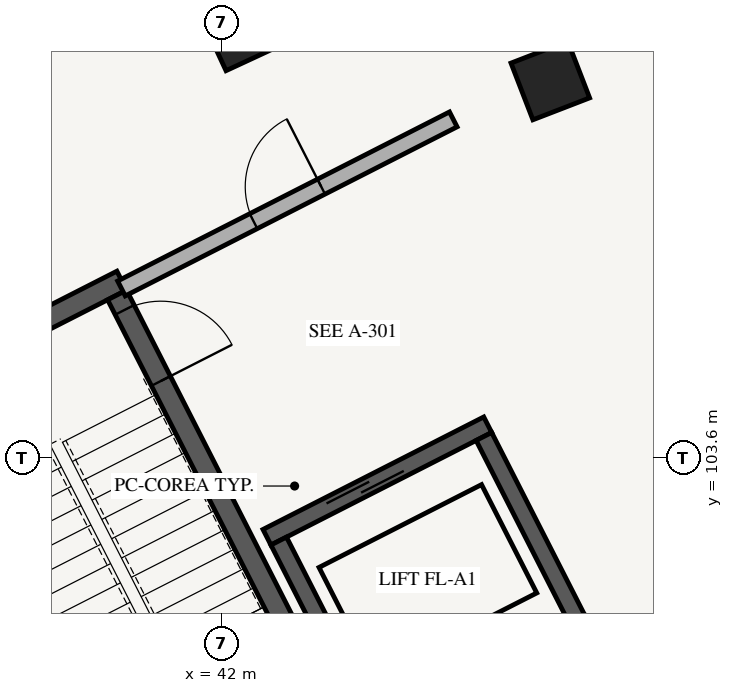
"""IFC4 building model, lengths in metres.
Left out: names, types, materials, properties, quantities, classifications, styles, units other than length and angle.
Written with IfcOpenShell. Run it as: python <this file> out.ifc"""

import sys

from ifc_helpers import new_model, si_unit, direction, frame, frame_2d, origin, origin_2d, place, context, subcontext, project, spatial, rectangle, extrude, element, fill, save


model = new_model("IFC4")
c1 = context("Model", 3, precision=1e-05, world=origin(), true_north=direction((0.0, 1.0)))
c2 = subcontext(c1, "Body", "Model", "MODEL_VIEW")
j1 = project(units=[si_unit("LENGTHUNIT", "METRE"), si_unit("PLANEANGLEUNIT", "RADIAN")], contexts=[c1])
p1 = place(None, origin())
s1 = spatial("IfcSite", under=j1, at=p1, CompositionType="ELEMENT")
p2 = place(p1, origin())
s2 = spatial("IfcBuilding", under=s1, at=p2, CompositionType="ELEMENT")
p3 = place(p2, frame((0.0, 0.0, -4.2)))
s3 = spatial("IfcBuildingStorey", under=s2, at=p3, CompositionType="ELEMENT", Elevation=-4.2)
p4 = place(p3, frame((37.773, 104.296, 0.0), z_axis=(0.0, 0.0, 1.0), x_axis=(0.453992276384, -0.891005618941, 0.0)))
e1 = element("IfcWall", 1, at=p4, inside=s3, PredefinedType="SHEAR", context=c2, shape_type="SweptSolid", body=[
    extrude(rectangle(XDim=6.6, YDim=0.28, at=frame_2d((3.3, 0.0))), origin(), (0.0, 0.0, 1.0), 3.92),
])
p5 = place(p3, frame((37.585, 104.357, 0.0), z_axis=(0.0, 0.0, 1.0), x_axis=(0.891020222667, 0.453963613958, 0.0)))
e2 = element("IfcWall", 2, at=p5, inside=s3, PredefinedType="SHEAR", context=c2, shape_type="SweptSolid", body=[
    extrude(rectangle(XDim=3.48, YDim=0.28, at=frame_2d((1.74, 0.0))), origin(), (0.0, 0.0, 1.0), 3.92),
])
p6 = place(p3, frame((40.625, 105.748, 0.0), z_axis=(0.0, 0.0, 1.0), x_axis=(0.453992276384, -0.891005618941, 0.0)))
e3 = element("IfcWall", 3, at=p6, inside=s3, PredefinedType="SHEAR", context=c2, shape_type="SweptSolid", body=[
    extrude(rectangle(XDim=6.6, YDim=0.28, at=frame_2d((3.3, 0.0))), origin(), (0.0, 0.0, 1.0), 3.92),
])
p7 = place(p6, frame((0.22, 0.0, 0.0)))
e4 = element("IfcOpeningElement", 4, at=p7, cuts=e3, PredefinedType="OPENING", context=c2, shape_type="SweptSolid", body=[
    extrude(rectangle(XDim=1.05, YDim=2.15, at=frame_2d((0.525, 1.075))), frame((0.0, 0.15, 0.0), z_axis=(0.0, -1.0, 0.0), x_axis=(1.0, 0.0, 0.0)), (0.0, 0.0, 1.0), 0.3),
])
p8 = place(p3, frame((42.597, 102.561, 0.0), z_axis=(0.0, 0.0, 1.0), x_axis=(0.891001200497, 0.454000947921, 0.0)))
e5 = element("IfcWall", 5, at=p8, inside=s3, PredefinedType="SHEAR", context=c2, shape_type="SweptSolid", body=[
    extrude(rectangle(XDim=3.26, YDim=0.23, at=frame_2d((1.63, 0.0))), origin(), (0.0, 0.0, 1.0), 3.92),
])
p9 = place(p8, frame((0.9, 0.0, 0.0)))
e6 = element("IfcOpeningElement", 6, at=p9, cuts=e5, PredefinedType="OPENING", context=c2, shape_type="SweptSolid", body=[
    extrude(rectangle(XDim=1.1, YDim=2.15, at=frame_2d((0.55, 1.075))), frame((0.0, 0.125, 0.0), z_axis=(0.0, -1.0, 0.0), x_axis=(1.0, 0.0, 0.0)), (0.0, 0.0, 1.0), 0.25),
])
for number, where, z_axis, x_axis in (
    (7, (42.751, 102.511, 0.0), (0.0, 0.0, 1.0), (0.454, -0.891, 0.0)),
    (8, (45.451, 103.886, 0.0), (0.0, 0.0, 1.0), (0.454, -0.891, 0.0)),
):
    element("IfcWall", number, at=place(p3, frame(where, z_axis=z_axis, x_axis=x_axis)), inside=s3, PredefinedType="SHEAR", context=c2, shape_type="SweptSolid", body=[
        extrude(rectangle(XDim=2.7, YDim=0.23, at=frame_2d((1.35, 0.0))), origin(), (0.0, 0.0, 1.0), 3.92),
    ])
for number, where, z_axis, x_axis in (
    (9, (46.325, 108.57, 0.0), (0.0, 0.0, 1.0), (-0.36, 0.933, 0.0)),
    (10, (42.252, 109.23, 0.0), (0.0, 0.0, 1.0), (-0.421, 0.907, 0.0)),
):
    element("IfcColumn", number, at=place(p3, frame(where, z_axis=z_axis, x_axis=x_axis)), inside=s3, PredefinedType="COLUMN", context=c2, shape_type="SweptSolid", body=[
        extrude(rectangle(XDim=0.8, YDim=0.8, at=origin_2d()), origin(), (0.0, 0.0, 1.0), 3.92),
    ])
p10 = place(p3, frame((40.682, 105.834, 0.0), z_axis=(0.0, 0.0, 1.0), x_axis=(0.891003372311, 0.453996685595, 0.0)))
e11 = element("IfcWall", 11, at=p10, inside=s3, PredefinedType="PARTITIONING", context=c2, shape_type="SweptSolid", body=[
    extrude(rectangle(XDim=4.9, YDim=0.22, at=frame_2d((2.45, 0.0))), origin(), (0.0, 0.0, 1.0), 3.18),
])
p11 = place(p10, frame((1.95, 0.0, 0.0)))
e12 = element("IfcOpeningElement", 12, at=p11, cuts=e11, PredefinedType="OPENING", context=c2, shape_type="SweptSolid", body=[
    extrude(rectangle(XDim=1.0, YDim=2.15, at=frame_2d((0.5, 1.075))), frame((0.0, 0.12, 0.0), z_axis=(0.0, -1.0, 0.0), x_axis=(1.0, 0.0, 0.0)), (0.0, 0.0, 1.0), 0.24),
])
p12 = place(p7, origin())
e13 = element("IfcDoor", 13, at=p12, inside=s3, OperationType="SINGLE_SWING_RIGHT", PredefinedType="DOOR", context=c2, shape_type="SweptSolid", body=[
    extrude(rectangle(XDim=1.05, YDim=2.15, at=frame_2d((0.525, 1.075))), frame((0.0, 0.025, 0.0), z_axis=(0.0, -1.0, 0.0), x_axis=(1.0, 0.0, 0.0)), (0.0, 0.0, 1.0), 0.05),
])
fill(e4, e13)
p13 = place(p9, origin())
e14 = element("IfcDoor", 14, at=p13, inside=s3, OperationType="DOUBLE_DOOR_SLIDING", PredefinedType="DOOR", context=c2, shape_type="SweptSolid", body=[
    extrude(rectangle(XDim=1.1, YDim=2.15, at=frame_2d((0.55, 1.075))), frame((0.0, 0.025, 0.0), z_axis=(0.0, -1.0, 0.0), x_axis=(1.0, 0.0, 0.0)), (0.0, 0.0, 1.0), 0.05),
])
fill(e6, e14)
p14 = place(p11, origin())
e15 = element("IfcDoor", 15, at=p14, inside=s3, OperationType="SINGLE_SWING_RIGHT", PredefinedType="DOOR", context=c2, shape_type="SweptSolid", body=[
    extrude(rectangle(XDim=1.0, YDim=2.15, at=frame_2d((0.5, 1.075))), frame((0.0, 0.025, 0.0), z_axis=(0.0, -1.0, 0.0), x_axis=(1.0, 0.0, 0.0)), (0.0, 0.0, 1.0), 0.05),
])
fill(e12, e15)
save(model, sys.argv[1])
